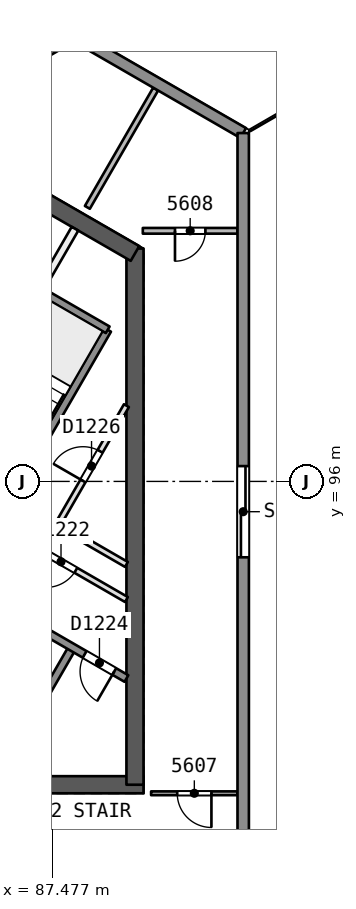
"""IFC4 building model, lengths in metres.
Left out: names, types, materials, properties, quantities, classifications, styles, units other than length and angle.
Written with IfcOpenShell. Run it as: python <this file> out.ifc"""

import sys

from ifc_helpers import new_model, si_unit, direction, frame, frame_2d, origin, origin_2d, place, context, subcontext, project, spatial, rectangle, extrude, element, fill, save


model = new_model("IFC4")
c1 = context("Model", 3, precision=1e-05, world=origin(), true_north=direction((0.0, 1.0)))
c2 = subcontext(c1, "Body", "Model", "MODEL_VIEW")
j1 = project(units=[si_unit("LENGTHUNIT", "METRE"), si_unit("PLANEANGLEUNIT", "RADIAN")], contexts=[c1])
p1 = place(None, origin())
s1 = spatial("IfcSite", under=j1, at=p1, CompositionType="ELEMENT")
p2 = place(p1, origin())
s2 = spatial("IfcBuilding", under=s1, at=p2, CompositionType="ELEMENT")
p3 = place(p2, frame((0.0, 0.0, 228.0)))
s3 = spatial("IfcBuildingStorey", under=s2, at=p3, CompositionType="ELEMENT", Elevation=228.0)
p4 = place(p3, frame((79.63, 88.019, 0.0), z_axis=(0.0, 0.0, 1.0), x_axis=(1.0, 0.0, 0.0)))
e1 = element("IfcWall", 1, at=p4, inside=s3, PredefinedType="SHEAR", context=c2, shape_type="SweptSolid", body=[
    extrude(rectangle(XDim=10.25, YDim=0.45, at=frame_2d((5.125, 0.0))), origin(), (0.0, 0.0, 1.0), 3.7),
])
p5 = place(p4, frame((0.82, 0.0, 0.0)))
e2 = element("IfcOpeningElement", 2, at=p5, cuts=e1, PredefinedType="OPENING", context=c2, shape_type="SweptSolid", body=[
    extrude(rectangle(XDim=1.2, YDim=2.1, at=frame_2d((0.6, 1.05))), frame((0.0, 0.235, 0.0), z_axis=(0.0, -1.0, 0.0), x_axis=(1.0, 0.0, 0.0)), (0.0, 0.0, 1.0), 0.471),
])
p6 = place(p3, frame((89.655, 88.019, 0.0), z_axis=(0.0, 0.0, 1.0), x_axis=(0.0, 1.0, 0.0)))
e3 = element("IfcWall", 3, at=p6, inside=s3, PredefinedType="SHEAR", context=c2, shape_type="SweptSolid", body=[
    extrude(rectangle(XDim=14.108, YDim=0.45, at=frame_2d((7.054, 0.0))), origin(), (0.0, 0.0, 1.0), 3.7),
])
p7 = place(p3, frame((89.655, 101.998, 0.0), z_axis=(0.0, 0.0, 1.0), x_axis=(-0.866042179588, 0.49997094233, 0.0)))
e4 = element("IfcWall", 4, at=p7, inside=s3, PredefinedType="SHEAR", context=c2, shape_type="SweptSolid", body=[
    extrude(rectangle(XDim=3.515, YDim=0.45, at=frame_2d((1.758, 0.0))), origin(), (0.0, 0.0, 1.0), 3.7),
])
p8 = place(p3, frame((91.548, 108.662, 0.0), z_axis=(-0.017607037296, -0.030466109479, 0.999380712447), x_axis=(0.865812389079, -0.500368770925, 1.01334e-07)))
e5 = element("IfcColumn", 5, at=p8, inside=s3, PredefinedType="COLUMN", context=c2, shape_type="SweptSolid", body=[
    extrude(rectangle(XDim=1.9, YDim=1.9, at=origin_2d()), origin(), (0.0, 0.0, 1.0), 3.702),
])
p9 = place(p3, frame((92.354, 87.794, 0.0), z_axis=(0.0, 0.0, 1.0), x_axis=(-1.0, 0.0, 0.0)))
e6 = element("IfcWall", 6, at=p9, inside=s3, PredefinedType="PARTITIONING", context=c2, shape_type="SweptSolid", body=[
    extrude(rectangle(XDim=2.274, YDim=0.1, at=frame_2d((1.137, 0.0))), origin(), (0.0, 0.0, 1.0), 3.3),
])
p10 = place(p9, frame((0.687, 0.0, 0.0)))
e7 = element("IfcOpeningElement", 7, at=p10, cuts=e6, PredefinedType="OPENING", context=c2, shape_type="SweptSolid", body=[
    extrude(rectangle(XDim=0.9, YDim=2.1, at=frame_2d((0.45, 1.05))), frame((0.0, 0.061, 0.0), z_axis=(0.0, -1.0, 0.0), x_axis=(1.0, 0.0, 0.0)), (0.0, 0.0, 1.0), 0.121),
])
p11 = place(p3, frame((92.354, 102.594, 0.0), z_axis=(0.0, 0.0, 1.0), x_axis=(-1.0, 0.0, 0.0)))
e8 = element("IfcWall", 8, at=p11, inside=s3, PredefinedType="PARTITIONING", context=c2, shape_type="SweptSolid", body=[
    extrude(rectangle(XDim=2.492, YDim=0.15, at=frame_2d((1.246, 0.0))), origin(), (0.0, 0.0, 1.0), 3.3),
])
p12 = place(p11, frame((0.846, 0.0, 0.0)))
e9 = element("IfcOpeningElement", 9, at=p12, cuts=e8, PredefinedType="OPENING", context=c2, shape_type="SweptSolid", body=[
    extrude(rectangle(XDim=0.8, YDim=2.1, at=frame_2d((0.4, 1.05))), frame((0.0, 0.085, 0.0), z_axis=(0.0, -1.0, 0.0), x_axis=(1.0, 0.0, 0.0)), (0.0, 0.0, 1.0), 0.171),
])
p13 = place(p3, frame((90.199, 106.324, 0.0), z_axis=(0.0, 0.0, 1.0), x_axis=(-0.500032055595, -0.866006895687, 0.0)))
e10 = element("IfcWall", 10, at=p13, inside=s3, PredefinedType="PARTITIONING", context=c2, shape_type="SweptSolid", body=[
    extrude(rectangle(XDim=3.595, YDim=0.15, at=frame_2d((1.797, 0.0))), origin(), (0.0, 0.0, 1.0), 3.3),
])
p14 = place(p3, frame((88.043, 107.741, 0.0), z_axis=(0.0, 0.0, 1.0), x_axis=(0.866011086668, -0.500024797153, 0.0)))
e11 = element("IfcWall", 11, at=p14, inside=s3, PredefinedType="SOLIDWALL", context=c2, shape_type="SweptSolid", body=[
    extrude(rectangle(XDim=5.149, YDim=0.3, at=frame_2d((2.575, 0.0))), origin(), (0.0, 0.0, 1.0), 3.3),
])
p15 = place(p3, frame((92.503, 105.166, 0.0), z_axis=(0.0, 0.0, 1.0), x_axis=(0.0, -1.0, 0.0)))
e12 = element("IfcWall", 12, at=p15, inside=s3, PredefinedType="SOLIDWALL", context=c2, shape_type="SweptSolid", body=[
    extrude(rectangle(XDim=50.333, YDim=0.3, at=frame_2d((25.166, 0.0))), origin(), (0.0, 0.0, 1.0), 3.3),
])
p16 = place(p15, frame((29.111, 0.0, 0.0)))
e13 = element("IfcOpeningElement", 13, at=p16, cuts=e12, PredefinedType="OPENING", context=c2, shape_type="SweptSolid", body=[
    extrude(rectangle(XDim=2.4, YDim=2.4, at=frame_2d((1.2, 1.2))), frame((0.0, 0.161, 0.0), z_axis=(0.0, -1.0, 0.0), x_axis=(1.0, 0.0, 0.0)), (0.0, 0.0, 1.0), 0.321),
])
p17 = place(p15, frame((39.164, 0.0, 0.0)))
e14 = element("IfcOpeningElement", 14, at=p17, cuts=e12, PredefinedType="OPENING", context=c2, shape_type="SweptSolid", body=[
    extrude(rectangle(XDim=2.4, YDim=2.4, at=frame_2d((1.2, 1.2))), frame((0.0, 0.161, 0.0), z_axis=(0.0, -1.0, 0.0), x_axis=(1.0, 0.0, 0.0)), (0.0, 0.0, 1.0), 0.321),
])
p18 = place(p15, frame((18.666, 0.0, 0.0)))
e15 = element("IfcOpeningElement", 15, at=p18, cuts=e12, PredefinedType="OPENING", context=c2, shape_type="SweptSolid", body=[
    extrude(rectangle(XDim=2.4, YDim=2.4, at=frame_2d((1.2, 1.2))), frame((0.0, 0.161, 0.0), z_axis=(0.0, -1.0, 0.0), x_axis=(1.0, 0.0, 0.0)), (0.0, 0.0, 1.0), 0.321),
])
p19 = place(p15, frame((8.763, 0.0, 0.0)))
e16 = element("IfcOpeningElement", 16, at=p19, cuts=e12, PredefinedType="OPENING", context=c2, shape_type="SweptSolid", body=[
    extrude(rectangle(XDim=2.4, YDim=2.4, at=frame_2d((1.2, 1.2))), frame((0.0, 0.161, 0.0), z_axis=(0.0, -1.0, 0.0), x_axis=(1.0, 0.0, 0.0)), (0.0, 0.0, 1.0), 0.321),
])
p20 = place(p15, frame((23.811, 0.0, 0.0)))
e17 = element("IfcOpeningElement", 17, at=p20, cuts=e12, PredefinedType="OPENING", context=c2, shape_type="SweptSolid", body=[
    extrude(rectangle(XDim=2.4, YDim=2.4, at=frame_2d((1.2, 1.2))), frame((0.0, 0.161, 0.0), z_axis=(0.0, -1.0, 0.0), x_axis=(1.0, 0.0, 0.0)), (0.0, 0.0, 1.0), 0.321),
])
p21 = place(p3, frame((44.454, 82.574, 0.0), z_axis=(0.0, 0.0, 1.0), x_axis=(0.86602387423, 0.500002649256, 0.0)))
e18 = element("IfcWall", 18, at=p21, inside=s3, PredefinedType="SOLIDWALL", context=c2, shape_type="SweptSolid", body=[
    extrude(rectangle(XDim=50.333, YDim=0.3, at=frame_2d((25.167, 0.0))), origin(), (0.0, 0.0, 1.0), 3.3),
])
p22 = place(p21, frame((24.122, 0.0, 0.0)))
e19 = element("IfcOpeningElement", 19, at=p22, cuts=e18, PredefinedType="OPENING", context=c2, shape_type="SweptSolid", body=[
    extrude(rectangle(XDim=2.4, YDim=2.4, at=frame_2d((1.2, 1.2))), frame((0.0, 0.161, 0.0), z_axis=(0.0, -1.0, 0.0), x_axis=(1.0, 0.0, 0.0)), (0.0, 0.0, 1.0), 0.321),
])
p23 = place(p21, frame((29.111, 0.0, 0.0)))
e20 = element("IfcOpeningElement", 20, at=p23, cuts=e18, PredefinedType="OPENING", context=c2, shape_type="SweptSolid", body=[
    extrude(rectangle(XDim=2.4, YDim=2.4, at=frame_2d((1.2, 1.2))), frame((0.0, 0.161, 0.0), z_axis=(0.0, -1.0, 0.0), x_axis=(1.0, 0.0, 0.0)), (0.0, 0.0, 1.0), 0.321),
])
p24 = place(p21, frame((39.164, 0.0, 0.0)))
e21 = element("IfcOpeningElement", 21, at=p24, cuts=e18, PredefinedType="OPENING", context=c2, shape_type="SweptSolid", body=[
    extrude(rectangle(XDim=2.4, YDim=2.4, at=frame_2d((1.2, 1.2))), frame((0.0, 0.161, 0.0), z_axis=(0.0, -1.0, 0.0), x_axis=(1.0, 0.0, 0.0)), (0.0, 0.0, 1.0), 0.321),
])
p25 = place(p21, frame((18.978, 0.0, 0.0)))
e22 = element("IfcOpeningElement", 22, at=p25, cuts=e18, PredefinedType="OPENING", context=c2, shape_type="SweptSolid", body=[
    extrude(rectangle(XDim=2.4, YDim=2.4, at=frame_2d((1.2, 1.2))), frame((0.0, 0.161, 0.0), z_axis=(0.0, -1.0, 0.0), x_axis=(1.0, 0.0, 0.0)), (0.0, 0.0, 1.0), 0.321),
])
p26 = place(p21, frame((8.763, 0.0, 0.0)))
e23 = element("IfcOpeningElement", 23, at=p26, cuts=e18, PredefinedType="OPENING", context=c2, shape_type="SweptSolid", body=[
    extrude(rectangle(XDim=2.4, YDim=2.4, at=frame_2d((1.2, 1.2))), frame((0.0, 0.161, 0.0), z_axis=(0.0, -1.0, 0.0), x_axis=(1.0, 0.0, 0.0)), (0.0, 0.0, 1.0), 0.321),
])
p27 = place(p3, frame((86.77, 89.486, 0.0), z_axis=(0.0, 0.0, 1.0), x_axis=(0.499961042966, 0.86604789447, 0.0)))
e24 = element("IfcWall", 24, at=p27, inside=s3, PredefinedType="SOLIDWALL", context=c2, shape_type="SweptSolid", body=[
    extrude(rectangle(XDim=2.48, YDim=0.2, at=frame_2d((1.24, 0.0))), origin(), (0.0, 0.0, 1.0), 3.3),
])
p28 = place(p3, frame((87.621, 94.86, 0.0), z_axis=(0.0, 0.0, 1.0), x_axis=(0.499993116331, 0.866029378036, 0.0)))
e25 = element("IfcWall", 25, at=p28, inside=s3, PredefinedType="PARTITIONING", context=c2, shape_type="SweptSolid", body=[
    extrude(rectangle(XDim=3.618, YDim=0.15, at=frame_2d((1.809, 0.0))), origin(), (0.0, 0.0, 1.0), 3.3),
])
p29 = place(p28, frame((1.332, 0.0, 0.0)))
e26 = element("IfcOpeningElement", 26, at=p29, cuts=e25, PredefinedType="OPENING", context=c2, shape_type="SweptSolid", body=[
    extrude(rectangle(XDim=0.9, YDim=2.1, at=frame_2d((0.45, 1.05))), frame((0.0, 0.085, 0.0), z_axis=(0.0, -1.0, 0.0), x_axis=(1.0, 0.0, 0.0)), (0.0, 0.0, 1.0), 0.171),
])
p30 = place(p3, frame((85.087, 93.321, 0.0), z_axis=(0.0, 0.0, 1.0), x_axis=(0.500019787375, 0.866013979237, 0.0)))
e27 = element("IfcWall", 27, at=p30, inside=s3, PredefinedType="SOLIDWALL", context=c2, shape_type="SweptSolid", body=[
    extrude(rectangle(XDim=7.7, YDim=0.2, at=frame_2d((3.85, 0.0))), origin(), (0.0, 0.0, 1.0), 3.3),
])
p31 = place(p3, frame((87.09, 100.94, 0.0), z_axis=(0.0, 0.0, 1.0), x_axis=(0.500011643316, 0.866018681408, 0.0)))
e28 = element("IfcWall", 28, at=p31, inside=s3, PredefinedType="PARTITIONING", context=c2, shape_type="SweptSolid", body=[
    extrude(rectangle(XDim=1.973, YDim=0.2, at=frame_2d((0.987, 0.0))), origin(), (0.0, 0.0, 1.0), 3.3),
])
p32 = place(p3, frame((89.43, 90.814, 0.0), z_axis=(0.0, 0.0, 1.0), x_axis=(-0.866018983788, 0.500011119594, 0.0)))
e29 = element("IfcWall", 29, at=p32, inside=s3, PredefinedType="SOLIDWALL", context=c2, shape_type="SweptSolid", body=[
    extrude(rectangle(XDim=10.64, YDim=0.2, at=frame_2d((5.32, 0.0))), origin(), (0.0, 0.0, 1.0), 3.3),
])
p33 = place(p32, frame((0.37, 0.0, 0.0)))
e30 = element("IfcOpeningElement", 30, at=p33, cuts=e29, PredefinedType="OPENING", context=c2, shape_type="SweptSolid", body=[
    extrude(rectangle(XDim=0.9, YDim=2.1, at=frame_2d((0.45, 1.05))), frame((0.0, 0.11, 0.0), z_axis=(0.0, -1.0, 0.0), x_axis=(1.0, 0.0, 0.0)), (0.0, 0.0, 1.0), 0.221),
])
p34 = place(p3, frame((89.43, 92.892, 0.0), z_axis=(0.0, 0.0, 1.0), x_axis=(-0.866019912421, 0.500009511199, 0.0)))
e31 = element("IfcWall", 31, at=p34, inside=s3, PredefinedType="PARTITIONING", context=c2, shape_type="SweptSolid", body=[
    extrude(rectangle(XDim=3.976, YDim=0.15, at=frame_2d((1.988, 0.0))), origin(), (0.0, 0.0, 1.0), 3.3),
])
p35 = place(p34, frame((1.538, 0.0, 0.0)))
e32 = element("IfcOpeningElement", 32, at=p35, cuts=e31, PredefinedType="OPENING", context=c2, shape_type="SweptSolid", body=[
    extrude(rectangle(XDim=0.9, YDim=2.1, at=frame_2d((0.45, 1.05))), frame((0.0, 0.085, 0.0), z_axis=(0.0, -1.0, 0.0), x_axis=(1.0, 0.0, 0.0)), (0.0, 0.0, 1.0), 0.171),
])
p36 = place(p3, frame((89.43, 93.816, 0.0), z_axis=(0.0, 0.0, 1.0), x_axis=(-0.866004557827, 0.500036104519, 0.0)))
e33 = element("IfcWall", 33, at=p36, inside=s3, PredefinedType="PARTITIONING", context=c2, shape_type="SweptSolid", body=[
    extrude(rectangle(XDim=2.089, YDim=0.15, at=frame_2d((1.044, 0.0))), origin(), (0.0, 0.0, 1.0), 3.3),
])
p37 = place(p3, frame((88.937, 99.99, 0.0), z_axis=(0.0, 0.0, 1.0), x_axis=(-0.866004344652, 0.500036473714, 0.0)))
e34 = element("IfcWall", 34, at=p37, inside=s3, PredefinedType="SOLIDWALL", context=c2, shape_type="SweptSolid", body=[
    extrude(rectangle(XDim=4.15, YDim=0.2, at=frame_2d((2.075, 0.0))), origin(), (0.0, 0.0, 1.0), 3.3),
])
p38 = place(p10, origin())
e35 = element("IfcDoor", 35, at=p38, inside=s3, OperationType="SINGLE_SWING_LEFT", PredefinedType="NOTDEFINED", context=c2, shape_type="SweptSolid", body=[
    extrude(rectangle(XDim=0.9, YDim=2.1, at=frame_2d((0.45, 1.05))), frame((0.0, 0.025, 0.0), z_axis=(0.0, -1.0, 0.0), x_axis=(1.0, 0.0, 0.0)), (0.0, 0.0, 1.0), 0.05),
])
fill(e7, e35)
p39 = place(p12, origin())
e36 = element("IfcDoor", 36, at=p39, inside=s3, OperationType="SINGLE_SWING_RIGHT", PredefinedType="NOTDEFINED", context=c2, shape_type="SweptSolid", body=[
    extrude(rectangle(XDim=0.8, YDim=2.1, at=frame_2d((0.4, 1.05))), frame((0.0, 0.025, 0.0), z_axis=(0.0, -1.0, 0.0), x_axis=(1.0, 0.0, 0.0)), (0.0, 0.0, 1.0), 0.05),
])
fill(e9, e36)
p40 = place(p19, origin())
e37 = element("IfcDoor", 37, at=p40, inside=s3, OperationType="SLIDING_TO_RIGHT", PredefinedType="NOTDEFINED", context=c2, shape_type="SweptSolid", body=[
    extrude(rectangle(XDim=2.4, YDim=2.4, at=frame_2d((1.2, 1.2))), frame((0.0, 0.025, 0.0), z_axis=(0.0, -1.0, 0.0), x_axis=(1.0, 0.0, 0.0)), (0.0, 0.0, 1.0), 0.05),
])
fill(e16, e37)
p41 = place(p35, origin())
e38 = element("IfcDoor", 38, at=p41, inside=s3, OperationType="SINGLE_SWING_RIGHT", PredefinedType="NOTDEFINED", context=c2, shape_type="SweptSolid", body=[
    extrude(rectangle(XDim=0.9, YDim=2.1, at=frame_2d((0.45, 1.05))), frame((0.0, 0.025, 0.0), z_axis=(0.0, -1.0, 0.0), x_axis=(1.0, 0.0, 0.0)), (0.0, 0.0, 1.0), 0.05),
])
fill(e32, e38)
p42 = place(p33, origin())
e39 = element("IfcDoor", 39, at=p42, inside=s3, OperationType="SINGLE_SWING_LEFT", PredefinedType="NOTDEFINED", context=c2, shape_type="SweptSolid", body=[
    extrude(rectangle(XDim=0.9, YDim=2.1, at=frame_2d((0.45, 1.05))), frame((0.0, 0.025, 0.0), z_axis=(0.0, -1.0, 0.0), x_axis=(1.0, 0.0, 0.0)), (0.0, 0.0, 1.0), 0.05),
])
fill(e30, e39)
p43 = place(p29, origin())
e40 = element("IfcDoor", 40, at=p43, inside=s3, OperationType="SINGLE_SWING_LEFT", PredefinedType="NOTDEFINED", context=c2, shape_type="SweptSolid", body=[
    extrude(rectangle(XDim=0.9, YDim=2.1, at=frame_2d((0.45, 1.05))), frame((0.0, 0.025, 0.0), z_axis=(0.0, -1.0, 0.0), x_axis=(1.0, 0.0, 0.0)), (0.0, 0.0, 1.0), 0.05),
])
fill(e26, e40)
save(model, sys.argv[1])
